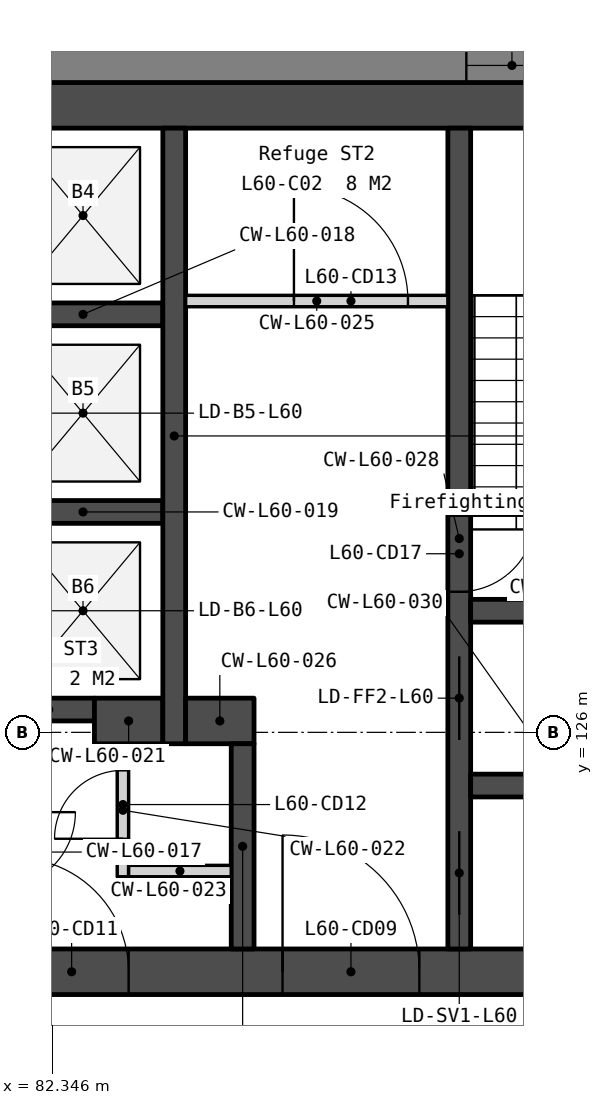
"""IFC4 building model, lengths in metres.
Left out: names, types, materials, properties, quantities, classifications, styles, units other than length and angle.
Written with IfcOpenShell. Run it as: python <this file> out.ifc"""

import sys

from ifc_helpers import new_model, si_unit, direction, frame, frame_2d, origin, place, context, subcontext, project, spatial, polyline, rectangle, outline, extrude, element, fill, save


model = new_model("IFC4")
c1 = context("Model", 3, precision=1e-05, world=origin(), true_north=direction((0.0, 1.0)))
c2 = subcontext(c1, "Body", "Model", "MODEL_VIEW")
j1 = project(units=[si_unit("LENGTHUNIT", "METRE"), si_unit("PLANEANGLEUNIT", "RADIAN")], contexts=[c1])
p1 = place(None, origin())
s1 = spatial("IfcSite", under=j1, at=p1, CompositionType="ELEMENT")
p2 = place(p1, origin())
s2 = spatial("IfcBuilding", under=s1, at=p2, CompositionType="ELEMENT")
p3 = place(p2, frame((0.0, 0.0, 246.5)))
s3 = spatial("IfcBuildingStorey", under=s2, at=p3, CompositionType="ELEMENT", Elevation=246.5)
p4 = place(p3, frame((69.0, 134.25, 0.0), z_axis=(0.0, 0.0, 1.0), x_axis=(1.0, 0.0, 0.0)))
e1 = element("IfcWall", 1, at=p4, inside=s3, PredefinedType="SOLIDWALL", context=c2, shape_type="SweptSolid", body=[
    extrude(rectangle(XDim=22.0, YDim=0.6, at=frame_2d((11.0, 0.0))), origin(), (0.0, 0.0, 1.0), 3.75),
])
p5 = place(p3, frame((69.0, 122.85, 0.0), z_axis=(0.0, 0.0, 1.0), x_axis=(1.0, 0.0, 0.0)))
e2 = element("IfcWall", 2, at=p5, inside=s3, PredefinedType="SOLIDWALL", context=c2, shape_type="SweptSolid", body=[
    extrude(rectangle(XDim=22.0, YDim=0.6, at=frame_2d((11.0, 0.0))), origin(), (0.0, 0.0, 1.0), 3.75),
])
p6 = place(p5, frame((16.375, 0.0, 0.0)))
e3 = element("IfcOpeningElement", 3, at=p6, cuts=e2, PredefinedType="OPENING", context=c2, shape_type="SweptSolid", body=[
    extrude(rectangle(XDim=1.8, YDim=2.1, at=frame_2d((0.9, 1.05))), frame((0.0, 0.31, 0.0), z_axis=(0.0, -1.0, 0.0), x_axis=(1.0, 0.0, 0.0)), (0.0, 0.0, 1.0), 0.62),
])
p7 = place(p5, frame((3.825, 0.0, 0.0)))
e4 = element("IfcOpeningElement", 4, at=p7, cuts=e2, PredefinedType="OPENING", context=c2, shape_type="SweptSolid", body=[
    extrude(rectangle(XDim=1.8, YDim=2.1, at=frame_2d((0.9, 1.05))), frame((0.0, 0.31, 0.0), z_axis=(0.0, -1.0, 0.0), x_axis=(1.0, 0.0, 0.0)), (0.0, 0.0, 1.0), 0.62),
])
p8 = place(p5, frame((12.85, 0.0, 0.0)))
e5 = element("IfcOpeningElement", 5, at=p8, cuts=e2, PredefinedType="OPENING", context=c2, shape_type="SweptSolid", body=[
    extrude(rectangle(XDim=1.5, YDim=2.1, at=frame_2d((0.75, 1.05))), frame((0.0, 0.31, 0.0), z_axis=(0.0, -1.0, 0.0), x_axis=(1.0, 0.0, 0.0)), (0.0, 0.0, 1.0), 0.62),
])
for number, where, z_axis, x_axis in (
    (6, (81.7, 131.5, 0.0), (0.0, 0.0, 1.0), (1.0, 0.0, 0.0)),
    (7, (81.7, 128.9, 0.0), (0.0, 0.0, 1.0), (1.0, 0.0, 0.0)),
):
    element("IfcWall", number, at=place(p3, frame(where, z_axis=z_axis, x_axis=x_axis)), inside=s3, PredefinedType="SOLIDWALL", context=c2, shape_type="SweptSolid", body=[
        extrude(rectangle(XDim=2.1, YDim=0.3, at=frame_2d((1.05, 0.0))), origin(), (0.0, 0.0, 1.0), 3.75),
    ])
p9 = place(p3, frame((81.7, 126.3, 0.0), z_axis=(0.0, 0.0, 1.0), x_axis=(1.0, 0.0, 0.0)))
e8 = element("IfcWall", 8, at=p9, inside=s3, PredefinedType="SOLIDWALL", context=c2, shape_type="SweptSolid", body=[
    extrude(rectangle(XDim=1.2, YDim=0.3, at=frame_2d((0.6, 0.0))), origin(), (0.0, 0.0, 1.0), 3.75),
])
p10 = place(p3, frame((82.9, 126.15, 0.0), z_axis=(0.0, 0.0, 1.0), x_axis=(1.0, 0.0, 0.0)))
e9 = element("IfcWall", 9, at=p10, inside=s3, PredefinedType="SOLIDWALL", context=c2, shape_type="SweptSolid", body=[
    extrude(rectangle(XDim=0.9, YDim=0.6, at=frame_2d((0.45, 0.0))), origin(), (0.0, 0.0, 1.0), 3.75),
])
p11 = place(p3, frame((83.275, 125.85, 0.0), z_axis=(0.0, 0.0, 1.0), x_axis=(0.0, -1.0, 0.0)))
e10 = element("IfcWall", 10, at=p11, inside=s3, PredefinedType="PARTITIONING", context=c2, shape_type="SweptSolid", body=[
    extrude(rectangle(XDim=1.75, YDim=0.15, at=frame_2d((0.875, 0.0))), origin(), (0.0, 0.0, 1.0), 3.75),
])
p12 = place(p11, frame((0.35, 0.0, 0.0)))
e11 = element("IfcOpeningElement", 11, at=p12, cuts=e10, PredefinedType="OPENING", context=c2, shape_type="SweptSolid", body=[
    extrude(rectangle(XDim=0.9, YDim=2.1, at=frame_2d((0.45, 1.05))), frame((0.0, 0.085, 0.0), z_axis=(0.0, -1.0, 0.0), x_axis=(1.0, 0.0, 0.0)), (0.0, 0.0, 1.0), 0.17),
])
p13 = place(p3, frame((83.35, 124.175, 0.0), z_axis=(0.0, 0.0, 1.0), x_axis=(1.0, 0.0, 0.0)))
e12 = element("IfcWall", 12, at=p13, inside=s3, PredefinedType="PARTITIONING", context=c2, shape_type="SweptSolid", body=[
    extrude(rectangle(XDim=1.35, YDim=0.15, at=frame_2d((0.675, 0.0))), origin(), (0.0, 0.0, 1.0), 3.75),
])
p14 = place(p3, frame((83.95, 133.95, 0.0), z_axis=(0.0, 0.0, 1.0), x_axis=(0.0, -1.0, 0.0)))
e13 = element("IfcWall", 13, at=p14, inside=s3, PredefinedType="SOLIDWALL", context=c2, shape_type="SweptSolid", body=[
    extrude(rectangle(XDim=8.1, YDim=0.3, at=frame_2d((4.05, 0.0))), origin(), (0.0, 0.0, 1.0), 3.75),
])
p15 = place(p3, frame((84.1, 131.675, 0.0), z_axis=(0.0, 0.0, 1.0), x_axis=(1.0, 0.0, 0.0)))
e14 = element("IfcWall", 14, at=p15, inside=s3, PredefinedType="PARTITIONING", context=c2, shape_type="SweptSolid", body=[
    extrude(rectangle(XDim=3.45, YDim=0.15, at=frame_2d((1.725, 0.0))), origin(), (0.0, 0.0, 1.0), 3.75),
])
p16 = place(p15, frame((1.425, 0.0, 0.0)))
e15 = element("IfcOpeningElement", 15, at=p16, cuts=e14, PredefinedType="OPENING", context=c2, shape_type="SweptSolid", body=[
    extrude(rectangle(XDim=1.5, YDim=2.1, at=frame_2d((0.75, 1.05))), frame((0.0, 0.085, 0.0), z_axis=(0.0, -1.0, 0.0), x_axis=(1.0, 0.0, 0.0)), (0.0, 0.0, 1.0), 0.17),
])
p17 = place(p3, frame((84.1, 126.15, 0.0), z_axis=(0.0, 0.0, 1.0), x_axis=(1.0, 0.0, 0.0)))
e16 = element("IfcWall", 16, at=p17, inside=s3, PredefinedType="SOLIDWALL", context=c2, shape_type="SweptSolid", body=[
    extrude(rectangle(XDim=0.9, YDim=0.6, at=frame_2d((0.45, 0.0))), origin(), (0.0, 0.0, 1.0), 3.75),
])
p18 = place(p3, frame((84.85, 125.85, 0.0), z_axis=(0.0, 0.0, 1.0), x_axis=(0.0, -1.0, 0.0)))
e17 = element("IfcWall", 17, at=p18, inside=s3, PredefinedType="SOLIDWALL", context=c2, shape_type="SweptSolid", body=[
    extrude(rectangle(XDim=2.7, YDim=0.3, at=frame_2d((1.35, 0.0))), origin(), (0.0, 0.0, 1.0), 3.75),
])
p19 = place(p3, frame((87.7, 133.95, 0.0), z_axis=(0.0, 0.0, 1.0), x_axis=(0.0, -1.0, 0.0)))
e18 = element("IfcWall", 18, at=p19, inside=s3, PredefinedType="SOLIDWALL", context=c2, shape_type="SweptSolid", body=[
    extrude(rectangle(XDim=10.8, YDim=0.3, at=frame_2d((5.4, 0.0))), origin(), (0.0, 0.0, 1.0), 3.75),
])
p20 = place(p19, frame((6.95, 0.0, 0.0)))
e19 = element("IfcOpeningElement", 19, at=p20, cuts=e18, PredefinedType="OPENING", context=c2, shape_type="SweptSolid", body=[
    extrude(rectangle(XDim=1.1, YDim=2.1, at=frame_2d((0.55, 1.05))), frame((0.0, 0.16, 0.0), z_axis=(0.0, -1.0, 0.0), x_axis=(1.0, 0.0, 0.0)), (0.0, 0.0, 1.0), 0.32),
])
p21 = place(p19, frame((5.1, 0.0, 0.0)))
e20 = element("IfcOpeningElement", 20, at=p21, cuts=e18, PredefinedType="OPENING", context=c2, shape_type="SweptSolid", body=[
    extrude(rectangle(XDim=1.0, YDim=2.1, at=frame_2d((0.5, 1.05))), frame((0.0, 0.16, 0.0), z_axis=(0.0, -1.0, 0.0), x_axis=(1.0, 0.0, 0.0)), (0.0, 0.0, 1.0), 0.32),
])
p22 = place(p19, frame((9.25, 0.0, 0.0)))
e21 = element("IfcOpeningElement", 21, at=p22, cuts=e18, PredefinedType="OPENING", context=c2, shape_type="SweptSolid", body=[
    extrude(rectangle(XDim=1.1, YDim=2.1, at=frame_2d((0.55, 1.05))), frame((0.0, 0.16, 0.0), z_axis=(0.0, -1.0, 0.0), x_axis=(1.0, 0.0, 0.0)), (0.0, 0.0, 1.0), 0.32),
])
for number, where, z_axis, x_axis in (
    (22, (87.85, 127.6, 0.0), (0.0, 0.0, 1.0), (1.0, 0.0, 0.0)),
    (23, (87.85, 125.3, 0.0), (0.0, 0.0, 1.0), (1.0, 0.0, 0.0)),
):
    element("IfcWall", number, at=place(p3, frame(where, z_axis=z_axis, x_axis=x_axis)), inside=s3, PredefinedType="SOLIDWALL", context=c2, shape_type="SweptSolid", body=[
        extrude(rectangle(XDim=2.55, YDim=0.3, at=frame_2d((1.275, 0.0))), origin(), (0.0, 0.0, 1.0), 3.75),
    ])
p23 = place(p3, frame((98.486, 134.775, -0.15), z_axis=(0.0, 0.0, 1.0), x_axis=(-1.0, 0.0, 0.0)))
e24 = element("IfcWall", 24, at=p23, inside=s3, PredefinedType="SOLIDWALL", context=c2, shape_type="SweptSolid", body=[
    extrude(outline(polyline([(36.972, 0.0), (36.972, 3.9), (0.0, 3.9), (0.0, 0.0), (36.972, 0.0)])), frame((0.0, 0.225, 0.0), z_axis=(0.0, -1.0, 0.0), x_axis=(1.0, 0.0, 0.0)), (0.0, 0.0, 1.0), 0.45),
])
p24 = place(p23, frame((0.744, 0.0, 0.95)))
e25 = element("IfcOpeningElement", 25, at=p24, cuts=e24, PredefinedType="OPENING", context=c2, shape_type="SweptSolid", body=[
    extrude(rectangle(XDim=1.2, YDim=2.2, at=frame_2d((0.6, 1.1))), frame((0.0, 0.235, 0.0), z_axis=(0.0, -1.0, 0.0), x_axis=(1.0, 0.0, 0.0)), (0.0, 0.0, 1.0), 0.47),
])
p25 = place(p23, frame((7.793, 0.0, 0.95)))
e26 = element("IfcOpeningElement", 26, at=p25, cuts=e24, PredefinedType="OPENING", context=c2, shape_type="SweptSolid", body=[
    extrude(rectangle(XDim=1.2, YDim=2.2, at=frame_2d((0.6, 1.1))), frame((0.0, 0.235, 0.0), z_axis=(0.0, -1.0, 0.0), x_axis=(1.0, 0.0, 0.0)), (0.0, 0.0, 1.0), 0.47),
])
p26 = place(p23, frame((9.493, 0.0, 0.95)))
e27 = element("IfcOpeningElement", 27, at=p26, cuts=e24, PredefinedType="OPENING", context=c2, shape_type="SweptSolid", body=[
    extrude(rectangle(XDim=1.2, YDim=2.2, at=frame_2d((0.6, 1.1))), frame((0.0, 0.235, 0.0), z_axis=(0.0, -1.0, 0.0), x_axis=(1.0, 0.0, 0.0)), (0.0, 0.0, 1.0), 0.47),
])
p27 = place(p23, frame((17.036, 0.0, 0.95)))
e28 = element("IfcOpeningElement", 28, at=p27, cuts=e24, PredefinedType="OPENING", context=c2, shape_type="SweptSolid", body=[
    extrude(rectangle(XDim=1.2, YDim=2.2, at=frame_2d((0.6, 1.1))), frame((0.0, 0.235, 0.0), z_axis=(0.0, -1.0, 0.0), x_axis=(1.0, 0.0, 0.0)), (0.0, 0.0, 1.0), 0.47),
])
p28 = place(p23, frame((18.736, 0.0, 0.95)))
e29 = element("IfcOpeningElement", 29, at=p28, cuts=e24, PredefinedType="OPENING", context=c2, shape_type="SweptSolid", body=[
    extrude(rectangle(XDim=1.2, YDim=2.2, at=frame_2d((0.6, 1.1))), frame((0.0, 0.235, 0.0), z_axis=(0.0, -1.0, 0.0), x_axis=(1.0, 0.0, 0.0)), (0.0, 0.0, 1.0), 0.47),
])
p29 = place(p23, frame((26.279, 0.0, 0.95)))
e30 = element("IfcOpeningElement", 30, at=p29, cuts=e24, PredefinedType="OPENING", context=c2, shape_type="SweptSolid", body=[
    extrude(rectangle(XDim=1.2, YDim=2.2, at=frame_2d((0.6, 1.1))), frame((0.0, 0.235, 0.0), z_axis=(0.0, -1.0, 0.0), x_axis=(1.0, 0.0, 0.0)), (0.0, 0.0, 1.0), 0.47),
])
p30 = place(p23, frame((27.979, 0.0, 0.95)))
e31 = element("IfcOpeningElement", 31, at=p30, cuts=e24, PredefinedType="OPENING", context=c2, shape_type="SweptSolid", body=[
    extrude(rectangle(XDim=1.2, YDim=2.2, at=frame_2d((0.6, 1.1))), frame((0.0, 0.235, 0.0), z_axis=(0.0, -1.0, 0.0), x_axis=(1.0, 0.0, 0.0)), (0.0, 0.0, 1.0), 0.47),
])
p31 = place(p23, frame((35.028, 0.0, 0.95)))
e32 = element("IfcOpeningElement", 32, at=p31, cuts=e24, PredefinedType="OPENING", context=c2, shape_type="SweptSolid", body=[
    extrude(rectangle(XDim=1.2, YDim=2.2, at=frame_2d((0.6, 1.1))), frame((0.0, 0.235, 0.0), z_axis=(0.0, -1.0, 0.0), x_axis=(1.0, 0.0, 0.0)), (0.0, 0.0, 1.0), 0.47),
])
p32 = place(p3, frame((80.905, 101.188, -0.15), z_axis=(0.0, 0.0, 1.0), x_axis=(0.500002536638, 0.866023939251, 0.0)))
e33 = element("IfcWall", 33, at=p32, inside=s3, PredefinedType="SOLIDWALL", context=c2, shape_type="SweptSolid", body=[
    extrude(outline(polyline([(36.972, 0.0), (36.972, 3.9), (0.0, 3.9), (0.0, 0.0), (36.972, 0.0)])), frame((0.0, 0.225, 0.0), z_axis=(0.0, -1.0, 0.0), x_axis=(1.0, 0.0, 0.0)), (0.0, 0.0, 1.0), 0.45),
])
p33 = place(p32, frame((0.744, 0.0, 0.95)))
e34 = element("IfcOpeningElement", 34, at=p33, cuts=e33, PredefinedType="OPENING", context=c2, shape_type="SweptSolid", body=[
    extrude(rectangle(XDim=1.2, YDim=2.2, at=frame_2d((0.6, 1.1))), frame((0.0, 0.235, 0.0), z_axis=(0.0, -1.0, 0.0), x_axis=(1.0, 0.0, 0.0)), (0.0, 0.0, 1.0), 0.47),
])
p34 = place(p32, frame((7.793, 0.0, 0.95)))
e35 = element("IfcOpeningElement", 35, at=p34, cuts=e33, PredefinedType="OPENING", context=c2, shape_type="SweptSolid", body=[
    extrude(rectangle(XDim=1.2, YDim=2.2, at=frame_2d((0.6, 1.1))), frame((0.0, 0.235, 0.0), z_axis=(0.0, -1.0, 0.0), x_axis=(1.0, 0.0, 0.0)), (0.0, 0.0, 1.0), 0.47),
])
p35 = place(p32, frame((9.493, 0.0, 0.95)))
e36 = element("IfcOpeningElement", 36, at=p35, cuts=e33, PredefinedType="OPENING", context=c2, shape_type="SweptSolid", body=[
    extrude(rectangle(XDim=1.2, YDim=2.2, at=frame_2d((0.6, 1.1))), frame((0.0, 0.235, 0.0), z_axis=(0.0, -1.0, 0.0), x_axis=(1.0, 0.0, 0.0)), (0.0, 0.0, 1.0), 0.47),
])
p36 = place(p32, frame((17.036, 0.0, 0.95)))
e37 = element("IfcOpeningElement", 37, at=p36, cuts=e33, PredefinedType="OPENING", context=c2, shape_type="SweptSolid", body=[
    extrude(rectangle(XDim=1.2, YDim=2.2, at=frame_2d((0.6, 1.1))), frame((0.0, 0.235, 0.0), z_axis=(0.0, -1.0, 0.0), x_axis=(1.0, 0.0, 0.0)), (0.0, 0.0, 1.0), 0.47),
])
p37 = place(p32, frame((18.736, 0.0, 0.95)))
e38 = element("IfcOpeningElement", 38, at=p37, cuts=e33, PredefinedType="OPENING", context=c2, shape_type="SweptSolid", body=[
    extrude(rectangle(XDim=1.2, YDim=2.2, at=frame_2d((0.6, 1.1))), frame((0.0, 0.235, 0.0), z_axis=(0.0, -1.0, 0.0), x_axis=(1.0, 0.0, 0.0)), (0.0, 0.0, 1.0), 0.47),
])
p38 = place(p32, frame((26.279, 0.0, 0.95)))
e39 = element("IfcOpeningElement", 39, at=p38, cuts=e33, PredefinedType="OPENING", context=c2, shape_type="SweptSolid", body=[
    extrude(rectangle(XDim=1.2, YDim=2.2, at=frame_2d((0.6, 1.1))), frame((0.0, 0.235, 0.0), z_axis=(0.0, -1.0, 0.0), x_axis=(1.0, 0.0, 0.0)), (0.0, 0.0, 1.0), 0.47),
])
p39 = place(p32, frame((27.979, 0.0, 0.95)))
e40 = element("IfcOpeningElement", 40, at=p39, cuts=e33, PredefinedType="OPENING", context=c2, shape_type="SweptSolid", body=[
    extrude(rectangle(XDim=1.2, YDim=2.2, at=frame_2d((0.6, 1.1))), frame((0.0, 0.235, 0.0), z_axis=(0.0, -1.0, 0.0), x_axis=(1.0, 0.0, 0.0)), (0.0, 0.0, 1.0), 0.47),
])
p40 = place(p32, frame((35.028, 0.0, 0.95)))
e41 = element("IfcOpeningElement", 41, at=p40, cuts=e33, PredefinedType="OPENING", context=c2, shape_type="SweptSolid", body=[
    extrude(rectangle(XDim=1.2, YDim=2.2, at=frame_2d((0.6, 1.1))), frame((0.0, 0.235, 0.0), z_axis=(0.0, -1.0, 0.0), x_axis=(1.0, 0.0, 0.0)), (0.0, 0.0, 1.0), 0.47),
])
p41 = place(p20, origin())
e42 = element("IfcDoor", 42, at=p41, inside=s3, OperationType="SLIDING_TO_LEFT", PredefinedType="DOOR", context=c2, shape_type="SweptSolid", body=[
    extrude(rectangle(XDim=1.1, YDim=2.1, at=frame_2d((0.55, 1.05))), frame((0.0, 0.025, 0.0), z_axis=(0.0, -1.0, 0.0), x_axis=(1.0, 0.0, 0.0)), (0.0, 0.0, 1.0), 0.05),
])
fill(e19, e42)
p42 = place(p6, origin())
e43 = element("IfcDoor", 43, at=p42, inside=s3, OperationType="DOUBLE_DOOR_DOUBLE_SWING", PredefinedType="DOOR", context=c2, shape_type="SweptSolid", body=[
    extrude(rectangle(XDim=1.8, YDim=2.1, at=frame_2d((0.9, 1.05))), frame((0.0, 0.025, 0.0), z_axis=(0.0, -1.0, 0.0), x_axis=(1.0, 0.0, 0.0)), (0.0, 0.0, 1.0), 0.05),
])
fill(e3, e43)
p43 = place(p8, origin())
e44 = element("IfcDoor", 44, at=p43, inside=s3, OperationType="DOUBLE_DOOR_DOUBLE_SWING", PredefinedType="DOOR", context=c2, shape_type="SweptSolid", body=[
    extrude(rectangle(XDim=1.5, YDim=2.1, at=frame_2d((0.75, 1.05))), frame((0.0, 0.025, 0.0), z_axis=(0.0, -1.0, 0.0), x_axis=(1.0, 0.0, 0.0)), (0.0, 0.0, 1.0), 0.05),
])
fill(e5, e44)
p44 = place(p12, origin())
e45 = element("IfcDoor", 45, at=p44, inside=s3, OperationType="SINGLE_SWING_RIGHT", PredefinedType="DOOR", context=c2, shape_type="SweptSolid", body=[
    extrude(rectangle(XDim=0.9, YDim=2.1, at=frame_2d((0.45, 1.05))), frame((0.0, 0.025, 0.0), z_axis=(0.0, -1.0, 0.0), x_axis=(1.0, 0.0, 0.0)), (0.0, 0.0, 1.0), 0.05),
])
fill(e11, e45)
p45 = place(p16, origin())
e46 = element("IfcDoor", 46, at=p45, inside=s3, OperationType="DOUBLE_DOOR_DOUBLE_SWING", PredefinedType="DOOR", context=c2, shape_type="SweptSolid", body=[
    extrude(rectangle(XDim=1.5, YDim=2.1, at=frame_2d((0.75, 1.05))), frame((0.0, 0.025, 0.0), z_axis=(0.0, -1.0, 0.0), x_axis=(1.0, 0.0, 0.0)), (0.0, 0.0, 1.0), 0.05),
])
fill(e15, e46)
p46 = place(p21, origin())
e47 = element("IfcDoor", 47, at=p46, inside=s3, OperationType="SINGLE_SWING_LEFT", PredefinedType="DOOR", context=c2, shape_type="SweptSolid", body=[
    extrude(rectangle(XDim=1.0, YDim=2.1, at=frame_2d((0.5, 1.05))), frame((0.0, 0.025, 0.0), z_axis=(0.0, -1.0, 0.0), x_axis=(1.0, 0.0, 0.0)), (0.0, 0.0, 1.0), 0.05),
])
fill(e20, e47)
p47 = place(p22, origin())
e48 = element("IfcDoor", 48, at=p47, inside=s3, OperationType="SLIDING_TO_LEFT", PredefinedType="DOOR", context=c2, shape_type="SweptSolid", body=[
    extrude(rectangle(XDim=1.1, YDim=2.1, at=frame_2d((0.55, 1.05))), frame((0.0, 0.025, 0.0), z_axis=(0.0, -1.0, 0.0), x_axis=(1.0, 0.0, 0.0)), (0.0, 0.0, 1.0), 0.05),
])
fill(e21, e48)
p48 = place(p26, origin())
e49 = element("IfcWindow", 49, at=p48, inside=s3, PartitioningType="SINGLE_PANEL", PredefinedType="WINDOW", context=c2, shape_type="SweptSolid", body=[
    extrude(rectangle(XDim=1.2, YDim=2.2, at=frame_2d((0.6, 1.1))), frame((0.0, 0.03, 0.0), z_axis=(0.0, -1.0, 0.0), x_axis=(1.0, 0.0, 0.0)), (0.0, 0.0, 1.0), 0.06),
])
fill(e27, e49)
save(model, sys.argv[1])
